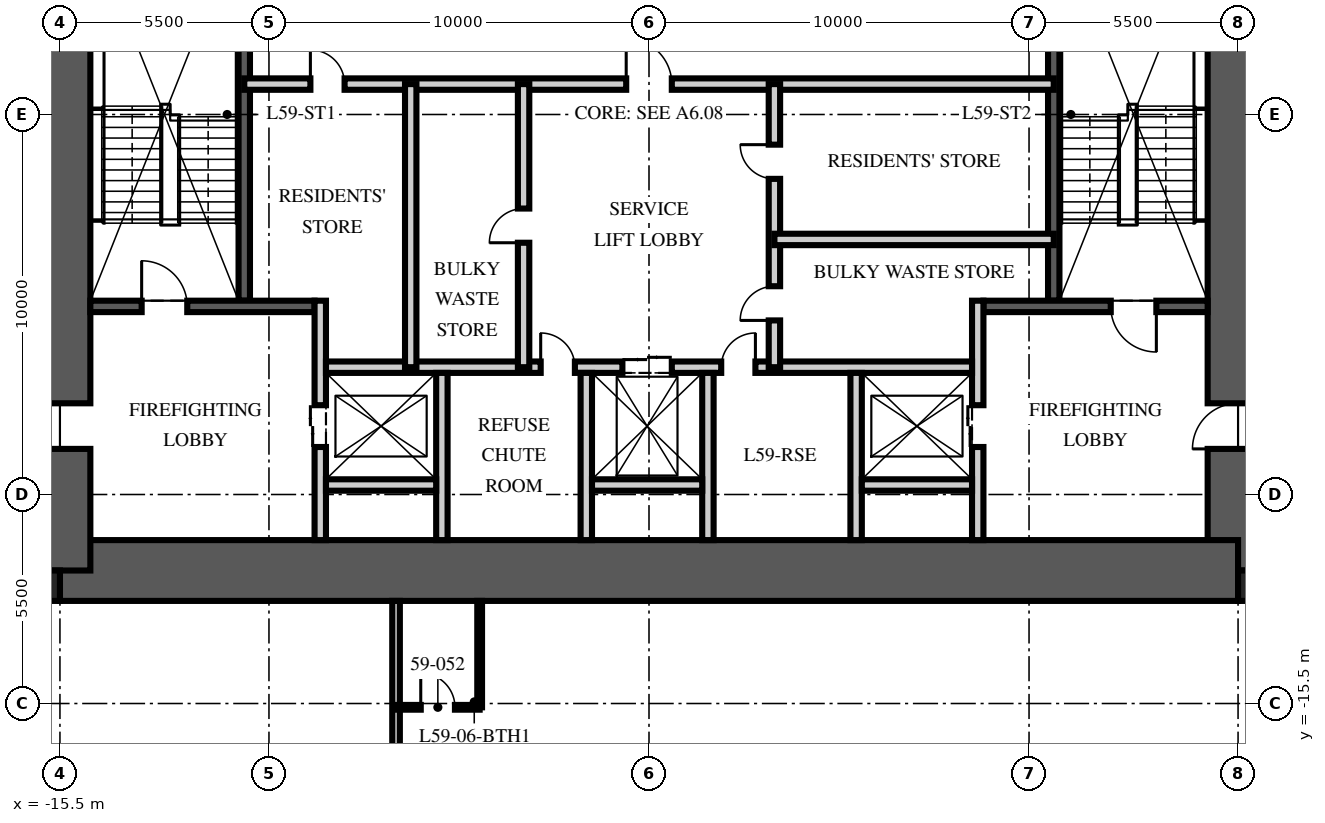
"""IFC4 building model, lengths in metres.
Left out: names, types, materials, properties, quantities, classifications, styles, units other than length and angle.
Written with IfcOpenShell. Run it as: python <this file> out.ifc"""

import sys

from ifc_helpers import new_model, si_unit, direction, frame, frame_2d, origin, origin_2d, place, context, subcontext, project, spatial, rectangle, extrude, element, fill, save


model = new_model("IFC4")
c1 = context("Model", 3, precision=1e-05, world=origin(), true_north=direction((0.0, 1.0)))
c2 = subcontext(c1, "Body", "Model", "MODEL_VIEW")
j1 = project(units=[si_unit("LENGTHUNIT", "METRE"), si_unit("PLANEANGLEUNIT", "RADIAN")], contexts=[c1])
p1 = place(None, origin())
s1 = spatial("IfcSite", under=j1, at=p1, CompositionType="ELEMENT")
p2 = place(p1, origin())
s2 = spatial("IfcBuilding", under=s1, at=p2, CompositionType="ELEMENT")
p3 = place(p2, frame((0.0, 0.0, 237.0)))
s3 = spatial("IfcBuildingStorey", under=s2, at=p3, CompositionType="ELEMENT", Elevation=237.0)
p4 = place(p3, frame((15.5, -12.0, -0.25), z_axis=(0.0, 0.0, 1.0), x_axis=(0.0, 1.0, 0.0)))
e1 = element("IfcWall", 1, at=p4, inside=s3, PredefinedType="SHEAR", context=c2, shape_type="SweptSolid", body=[
    extrude(rectangle(XDim=24.0, YDim=1.6, at=frame_2d((12.0, 0.0))), origin(), (0.0, 0.0, 1.0), 3.75),
])
p5 = place(p4, frame((3.2, 0.0, 0.25)))
e2 = element("IfcOpeningElement", 2, at=p5, cuts=e1, PredefinedType="OPENING", context=c2, shape_type="SweptSolid", body=[
    extrude(rectangle(XDim=1.2, YDim=2.1, at=frame_2d((0.6, 1.05))), frame((0.0, 0.81, 0.0), z_axis=(0.0, -1.0, 0.0), x_axis=(1.0, 0.0, 0.0)), (0.0, 0.0, 1.0), 1.62),
])
p6 = place(p4, frame((19.3, 0.0, 0.25)))
e3 = element("IfcOpeningElement", 3, at=p6, cuts=e1, PredefinedType="OPENING", context=c2, shape_type="SweptSolid", body=[
    extrude(rectangle(XDim=1.8, YDim=2.1, at=frame_2d((0.9, 1.05))), frame((0.0, 0.81, 0.0), z_axis=(0.0, -1.0, 0.0), x_axis=(1.0, 0.0, 0.0)), (0.0, 0.0, 1.0), 1.62),
])
p7 = place(p3, frame((-15.5, -12.0, -0.25), z_axis=(0.0, 0.0, 1.0), x_axis=(1.0, 0.0, 0.0)))
e4 = element("IfcWall", 4, at=p7, inside=s3, PredefinedType="SHEAR", context=c2, shape_type="SweptSolid", body=[
    extrude(rectangle(XDim=31.0, YDim=1.6, at=frame_2d((15.5, 0.0))), origin(), (0.0, 0.0, 1.0), 3.75),
])
p8 = place(p3, frame((-15.5, -12.0, -0.25), z_axis=(0.0, 0.0, 1.0), x_axis=(0.0, 1.0, 0.0)))
e5 = element("IfcWall", 5, at=p8, inside=s3, PredefinedType="SHEAR", context=c2, shape_type="SweptSolid", body=[
    extrude(rectangle(XDim=24.0, YDim=1.6, at=frame_2d((12.0, 0.0))), origin(), (0.0, 0.0, 1.0), 3.75),
])
p9 = place(p8, frame((3.2, 0.0, 0.25)))
e6 = element("IfcOpeningElement", 6, at=p9, cuts=e5, PredefinedType="OPENING", context=c2, shape_type="SweptSolid", body=[
    extrude(rectangle(XDim=1.2, YDim=2.1, at=frame_2d((0.6, 1.05))), frame((0.0, 0.81, 0.0), z_axis=(0.0, -1.0, 0.0), x_axis=(1.0, 0.0, 0.0)), (0.0, 0.0, 1.0), 1.62),
])
p10 = place(p8, frame((19.3, 0.0, 0.25)))
e7 = element("IfcOpeningElement", 7, at=p10, cuts=e5, PredefinedType="OPENING", context=c2, shape_type="SweptSolid", body=[
    extrude(rectangle(XDim=1.8, YDim=2.1, at=frame_2d((0.9, 1.05))), frame((0.0, 0.81, 0.0), z_axis=(0.0, -1.0, 0.0), x_axis=(1.0, 0.0, 0.0)), (0.0, 0.0, 1.0), 1.62),
])
for number, where, z_axis, x_axis in (
    (8, (-15.9, -12.4, -0.25), (0.0, 0.0, 1.0), (1.0, 0.0, 0.0)),
    (9, (15.9, -12.4, -0.25), (0.0, 0.0, 1.0), (1.0, 0.0, 0.0)),
):
    element("IfcColumn", number, at=place(p3, frame(where, z_axis=z_axis, x_axis=x_axis)), inside=s3, PredefinedType="COLUMN", context=c2, shape_type="SweptSolid", body=[
        extrude(rectangle(XDim=0.8, YDim=0.8, at=origin_2d()), origin(), (0.0, 0.0, 1.0), 3.75),
    ])
p11 = place(p3, frame((-10.65, -4.9, 0.0), z_axis=(0.0, 0.0, 1.0), x_axis=(0.0, 1.0, 0.0)))
e10 = element("IfcWall", 10, at=p11, inside=s3, PredefinedType="SOLIDWALL", context=c2, shape_type="SweptSolid", body=[
    extrude(rectangle(XDim=10.1, YDim=0.3, at=frame_2d((5.05, 0.0))), origin(), (0.0, 0.0, 1.0), 3.5),
])
p12 = place(p3, frame((-14.7, -5.05, 0.0), z_axis=(0.0, 0.0, 1.0), x_axis=(1.0, 0.0, 0.0)))
e11 = element("IfcWall", 11, at=p12, inside=s3, PredefinedType="SOLIDWALL", context=c2, shape_type="SweptSolid", body=[
    extrude(rectangle(XDim=5.9, YDim=0.3, at=frame_2d((2.95, 0.0))), origin(), (0.0, 0.0, 1.0), 3.5),
])
p13 = place(p12, frame((1.35, 0.0, 0.0)))
e12 = element("IfcOpeningElement", 12, at=p13, cuts=e11, PredefinedType="OPENING", context=c2, shape_type="SweptSolid", body=[
    extrude(rectangle(XDim=1.2, YDim=2.1, at=frame_2d((0.6, 1.05))), frame((0.0, 0.16, 0.0), z_axis=(0.0, -1.0, 0.0), x_axis=(1.0, 0.0, 0.0)), (0.0, 0.0, 1.0), 0.32),
])
p14 = place(p3, frame((-8.65, -11.2, 0.0), z_axis=(0.0, 0.0, 1.0), x_axis=(0.0, 1.0, 0.0)))
e13 = element("IfcWall", 13, at=p14, inside=s3, PredefinedType="PARTITIONING", context=c2, shape_type="SweptSolid", body=[
    extrude(rectangle(XDim=6.3, YDim=0.3, at=frame_2d((3.15, 0.0))), origin(), (0.0, 0.0, 1.0), 3.5),
])
p15 = place(p14, frame((2.45, 0.0, 0.0)))
e14 = element("IfcOpeningElement", 14, at=p15, cuts=e13, PredefinedType="OPENING", context=c2, shape_type="SweptSolid", body=[
    extrude(rectangle(XDim=1.1, YDim=2.1, at=frame_2d((0.55, 1.05))), frame((0.0, 0.16, 0.0), z_axis=(0.0, -1.0, 0.0), x_axis=(1.0, 0.0, 0.0)), (0.0, 0.0, 1.0), 0.32),
])
p16 = place(p3, frame((10.65, -4.9, 0.0), z_axis=(0.0, 0.0, 1.0), x_axis=(0.0, 1.0, 0.0)))
e15 = element("IfcWall", 15, at=p16, inside=s3, PredefinedType="SOLIDWALL", context=c2, shape_type="SweptSolid", body=[
    extrude(rectangle(XDim=10.1, YDim=0.3, at=frame_2d((5.05, 0.0))), origin(), (0.0, 0.0, 1.0), 3.5),
])
p17 = place(p3, frame((14.7, -5.05, 0.0), z_axis=(0.0, 0.0, 1.0), x_axis=(-1.0, 0.0, 0.0)))
e16 = element("IfcWall", 16, at=p17, inside=s3, PredefinedType="SOLIDWALL", context=c2, shape_type="SweptSolid", body=[
    extrude(rectangle(XDim=5.9, YDim=0.3, at=frame_2d((2.95, 0.0))), origin(), (0.0, 0.0, 1.0), 3.5),
])
p18 = place(p17, frame((1.35, 0.0, 0.0)))
e17 = element("IfcOpeningElement", 17, at=p18, cuts=e16, PredefinedType="OPENING", context=c2, shape_type="SweptSolid", body=[
    extrude(rectangle(XDim=1.2, YDim=2.1, at=frame_2d((0.6, 1.05))), frame((0.0, 0.16, 0.0), z_axis=(0.0, -1.0, 0.0), x_axis=(1.0, 0.0, 0.0)), (0.0, 0.0, 1.0), 0.32),
])
p19 = place(p3, frame((8.65, -11.2, 0.0), z_axis=(0.0, 0.0, 1.0), x_axis=(0.0, 1.0, 0.0)))
e18 = element("IfcWall", 18, at=p19, inside=s3, PredefinedType="PARTITIONING", context=c2, shape_type="SweptSolid", body=[
    extrude(rectangle(XDim=6.3, YDim=0.3, at=frame_2d((3.15, 0.0))), origin(), (0.0, 0.0, 1.0), 3.5),
])
p20 = place(p19, frame((2.45, 0.0, 0.0)))
e19 = element("IfcOpeningElement", 19, at=p20, cuts=e18, PredefinedType="OPENING", context=c2, shape_type="SweptSolid", body=[
    extrude(rectangle(XDim=1.1, YDim=2.1, at=frame_2d((0.55, 1.05))), frame((0.0, 0.16, 0.0), z_axis=(0.0, -1.0, 0.0), x_axis=(1.0, 0.0, 0.0)), (0.0, 0.0, 1.0), 0.32),
])
p21 = place(p3, frame((-8.5, -6.65, 0.0), z_axis=(0.0, 0.0, 1.0), x_axis=(1.0, 0.0, 0.0)))
e20 = element("IfcWall", 20, at=p21, inside=s3, PredefinedType="PARTITIONING", context=c2, shape_type="SweptSolid", body=[
    extrude(rectangle(XDim=17.0, YDim=0.3, at=frame_2d((8.5, 0.0))), origin(), (0.0, 0.0, 1.0), 3.5),
])
p22 = place(p21, frame((7.8, 0.0, 0.0)))
e21 = element("IfcOpeningElement", 21, at=p22, cuts=e20, PredefinedType="OPENING", context=c2, shape_type="SweptSolid", body=[
    extrude(rectangle(XDim=1.3, YDim=2.4, at=frame_2d((0.65, 1.2))), frame((0.0, 0.16, 0.0), z_axis=(0.0, -1.0, 0.0), x_axis=(1.0, 0.0, 0.0)), (0.0, 0.0, 1.0), 0.32),
])
p23 = place(p21, frame((5.65, 0.0, 0.0)))
e22 = element("IfcOpeningElement", 22, at=p23, cuts=e20, PredefinedType="OPENING", context=c2, shape_type="SweptSolid", body=[
    extrude(rectangle(XDim=0.9, YDim=2.1, at=frame_2d((0.45, 1.05))), frame((0.0, 0.16, 0.0), z_axis=(0.0, -1.0, 0.0), x_axis=(1.0, 0.0, 0.0)), (0.0, 0.0, 1.0), 0.32),
])
p24 = place(p21, frame((10.4, 0.0, 0.0)))
e23 = element("IfcOpeningElement", 23, at=p24, cuts=e20, PredefinedType="OPENING", context=c2, shape_type="SweptSolid", body=[
    extrude(rectangle(XDim=0.9, YDim=2.1, at=frame_2d((0.45, 1.05))), frame((0.0, 0.16, 0.0), z_axis=(0.0, -1.0, 0.0), x_axis=(1.0, 0.0, 0.0)), (0.0, 0.0, 1.0), 0.32),
])
for number, where, z_axis, x_axis in (
    (24, (-5.45, -11.2, 0.0), (0.0, 0.0, 1.0), (0.0, 1.0, 0.0)),
    (25, (-1.65, -11.2, 0.0), (0.0, 0.0, 1.0), (0.0, 1.0, 0.0)),
    (26, (1.55, -11.2, 0.0), (0.0, 0.0, 1.0), (0.0, 1.0, 0.0)),
    (27, (5.45, -11.2, 0.0), (0.0, 0.0, 1.0), (0.0, 1.0, 0.0)),
):
    element("IfcWall", number, at=place(p3, frame(where, z_axis=z_axis, x_axis=x_axis)), inside=s3, PredefinedType="PARTITIONING", context=c2, shape_type="SweptSolid", body=[
        extrude(rectangle(XDim=4.4, YDim=0.3, at=frame_2d((2.2, 0.0))), origin(), (0.0, 0.0, 1.0), 3.5),
    ])
for number, where, z_axis, x_axis in (
    (28, (-8.5, -9.75, 0.0), (0.0, 0.0, 1.0), (1.0, 0.0, 0.0)),
    (29, (-1.5, -9.75, 0.0), (0.0, 0.0, 1.0), (1.0, 0.0, 0.0)),
    (30, (5.6, -9.75, 0.0), (0.0, 0.0, 1.0), (1.0, 0.0, 0.0)),
):
    element("IfcWall", number, at=place(p3, frame(where, z_axis=z_axis, x_axis=x_axis)), inside=s3, PredefinedType="PARTITIONING", context=c2, shape_type="SweptSolid", body=[
        extrude(rectangle(XDim=2.9, YDim=0.3, at=frame_2d((1.45, 0.0))), origin(), (0.0, 0.0, 1.0), 3.5),
    ])
p25 = place(p3, frame((-10.65, 0.8, 0.0), z_axis=(0.0, 0.0, 1.0), x_axis=(1.0, 0.0, 0.0)))
e31 = element("IfcWall", 31, at=p25, inside=s3, PredefinedType="PARTITIONING", context=c2, shape_type="SweptSolid", body=[
    extrude(rectangle(XDim=21.3, YDim=0.3, at=frame_2d((10.65, 0.0))), origin(), (0.0, 0.0, 1.0), 3.5),
])
p26 = place(p25, frame((10.05, 0.0, 0.0)))
e32 = element("IfcOpeningElement", 32, at=p26, cuts=e31, PredefinedType="OPENING", context=c2, shape_type="SweptSolid", body=[
    extrude(rectangle(XDim=1.2, YDim=2.1, at=frame_2d((0.6, 1.05))), frame((0.0, 0.16, 0.0), z_axis=(0.0, -1.0, 0.0), x_axis=(1.0, 0.0, 0.0)), (0.0, 0.0, 1.0), 0.32),
])
p27 = place(p25, frame((1.74, 0.0, 0.0)))
e33 = element("IfcOpeningElement", 33, at=p27, cuts=e31, PredefinedType="OPENING", context=c2, shape_type="SweptSolid", body=[
    extrude(rectangle(XDim=0.9, YDim=2.1, at=frame_2d((0.45, 1.05))), frame((0.0, 0.16, 0.0), z_axis=(0.0, -1.0, 0.0), x_axis=(1.0, 0.0, 0.0)), (0.0, 0.0, 1.0), 0.32),
])
p28 = place(p3, frame((-3.3, -6.65, 0.0), z_axis=(0.0, 0.0, 1.0), x_axis=(0.0, 1.0, 0.0)))
e34 = element("IfcWall", 34, at=p28, inside=s3, PredefinedType="PARTITIONING", context=c2, shape_type="SweptSolid", body=[
    extrude(rectangle(XDim=7.45, YDim=0.3, at=frame_2d((3.725, 0.0))), origin(), (0.0, 0.0, 1.0), 3.5),
])
p29 = place(p28, frame((3.275, 0.0, 0.0)))
e35 = element("IfcOpeningElement", 35, at=p29, cuts=e34, PredefinedType="OPENING", context=c2, shape_type="SweptSolid", body=[
    extrude(rectangle(XDim=0.9, YDim=2.1, at=frame_2d((0.45, 1.05))), frame((0.0, 0.16, 0.0), z_axis=(0.0, -1.0, 0.0), x_axis=(1.0, 0.0, 0.0)), (0.0, 0.0, 1.0), 0.32),
])
p30 = place(p3, frame((3.3, -6.65, 0.0), z_axis=(0.0, 0.0, 1.0), x_axis=(0.0, 1.0, 0.0)))
e36 = element("IfcWall", 36, at=p30, inside=s3, PredefinedType="PARTITIONING", context=c2, shape_type="SweptSolid", body=[
    extrude(rectangle(XDim=7.45, YDim=0.3, at=frame_2d((3.725, 0.0))), origin(), (0.0, 0.0, 1.0), 3.5),
])
p31 = place(p30, frame((1.231, 0.0, 0.0)))
e37 = element("IfcOpeningElement", 37, at=p31, cuts=e36, PredefinedType="OPENING", context=c2, shape_type="SweptSolid", body=[
    extrude(rectangle(XDim=0.9, YDim=2.1, at=frame_2d((0.45, 1.05))), frame((0.0, 0.16, 0.0), z_axis=(0.0, -1.0, 0.0), x_axis=(1.0, 0.0, 0.0)), (0.0, 0.0, 1.0), 0.32),
])
p32 = place(p30, frame((4.956, 0.0, 0.0)))
e38 = element("IfcOpeningElement", 38, at=p32, cuts=e36, PredefinedType="OPENING", context=c2, shape_type="SweptSolid", body=[
    extrude(rectangle(XDim=0.9, YDim=2.1, at=frame_2d((0.45, 1.05))), frame((0.0, 0.16, 0.0), z_axis=(0.0, -1.0, 0.0), x_axis=(1.0, 0.0, 0.0)), (0.0, 0.0, 1.0), 0.32),
])
p33 = place(p3, frame((-6.27, -6.65, 0.0), z_axis=(0.0, 0.0, 1.0), x_axis=(0.0, 1.0, 0.0)))
e39 = element("IfcWall", 39, at=p33, inside=s3, PredefinedType="PARTITIONING", context=c2, shape_type="SweptSolid", body=[
    extrude(rectangle(XDim=7.45, YDim=0.3, at=frame_2d((3.725, 0.0))), origin(), (0.0, 0.0, 1.0), 3.5),
])
p34 = place(p3, frame((10.65, -3.288, 0.0), z_axis=(0.0, 0.0, 1.0), x_axis=(-1.0, 0.0, 0.0)))
e40 = element("IfcWall", 40, at=p34, inside=s3, PredefinedType="PARTITIONING", context=c2, shape_type="SweptSolid", body=[
    extrude(rectangle(XDim=7.35, YDim=0.3, at=frame_2d((3.675, 0.0))), origin(), (0.0, 0.0, 1.0), 3.5),
])
p35 = place(p3, frame((-6.656, -12.8, 0.0), z_axis=(0.0, 0.0, 1.0), x_axis=(0.0, -1.0, 0.0)))
e41 = element("IfcWall", 41, at=p35, inside=s3, PredefinedType="PARTITIONING", context=c2, shape_type="SweptSolid", body=[
    extrude(rectangle(XDim=13.15, YDim=0.2, at=frame_2d((6.575, 0.0))), origin(), (0.0, 0.0, 1.0), 2.91),
])
p36 = place(p3, frame((-6.656, -15.6, 0.0), z_axis=(0.0, 0.0, 1.0), x_axis=(1.0, 0.0, 0.0)))
e42 = element("IfcWall", 42, at=p36, inside=s3, PredefinedType="PARTITIONING", context=c2, shape_type="SweptSolid", body=[
    extrude(rectangle(XDim=2.2, YDim=0.125, at=frame_2d((1.1, 0.0))), origin(), (0.0, 0.0, 1.0), 3.5),
])
p37 = place(p36, frame((0.65, 0.0, 0.0)))
e43 = element("IfcOpeningElement", 43, at=p37, cuts=e42, PredefinedType="OPENING", context=c2, shape_type="SweptSolid", body=[
    extrude(rectangle(XDim=0.9, YDim=2.1, at=frame_2d((0.45, 1.05))), frame((0.0, 0.073, 0.0), z_axis=(0.0, -1.0, 0.0), x_axis=(1.0, 0.0, 0.0)), (0.0, 0.0, 1.0), 0.145),
])
p38 = place(p3, frame((-4.456, -12.8, 0.0), z_axis=(0.0, 0.0, 1.0), x_axis=(0.0, -1.0, 0.0)))
e44 = element("IfcWall", 44, at=p38, inside=s3, PredefinedType="PARTITIONING", context=c2, shape_type="SweptSolid", body=[
    extrude(rectangle(XDim=2.8, YDim=0.125, at=frame_2d((1.4, 0.0))), origin(), (0.0, 0.0, 1.0), 3.5),
])
p39 = place(p13, origin())
e45 = element("IfcDoor", 45, at=p39, inside=s3, OperationType="SINGLE_SWING_LEFT", PredefinedType="DOOR", context=c2, shape_type="SweptSolid", body=[
    extrude(rectangle(XDim=1.2, YDim=2.1, at=frame_2d((0.6, 1.05))), frame((0.0, 0.025, 0.0), z_axis=(0.0, -1.0, 0.0), x_axis=(1.0, 0.0, 0.0)), (0.0, 0.0, 1.0), 0.05),
])
fill(e12, e45)
p40 = place(p9, origin())
e46 = element("IfcDoor", 46, at=p40, inside=s3, OperationType="SINGLE_SWING_LEFT", PredefinedType="DOOR", context=c2, shape_type="SweptSolid", body=[
    extrude(rectangle(XDim=1.2, YDim=2.1, at=frame_2d((0.6, 1.05))), frame((0.0, 0.025, 0.0), z_axis=(0.0, -1.0, 0.0), x_axis=(1.0, 0.0, 0.0)), (0.0, 0.0, 1.0), 0.05),
])
fill(e6, e46)
p41 = place(p18, origin())
e47 = element("IfcDoor", 47, at=p41, inside=s3, OperationType="SINGLE_SWING_LEFT", PredefinedType="DOOR", context=c2, shape_type="SweptSolid", body=[
    extrude(rectangle(XDim=1.2, YDim=2.1, at=frame_2d((0.6, 1.05))), frame((0.0, 0.025, 0.0), z_axis=(0.0, -1.0, 0.0), x_axis=(1.0, 0.0, 0.0)), (0.0, 0.0, 1.0), 0.05),
])
fill(e17, e47)
p42 = place(p5, origin())
e48 = element("IfcDoor", 48, at=p42, inside=s3, OperationType="SINGLE_SWING_LEFT", PredefinedType="DOOR", context=c2, shape_type="SweptSolid", body=[
    extrude(rectangle(XDim=1.2, YDim=2.1, at=frame_2d((0.6, 1.05))), frame((0.0, 0.025, 0.0), z_axis=(0.0, -1.0, 0.0), x_axis=(1.0, 0.0, 0.0)), (0.0, 0.0, 1.0), 0.05),
])
fill(e2, e48)
p43 = place(p15, origin())
e49 = element("IfcDoor", 49, at=p43, inside=s3, OperationType="DOUBLE_DOOR_SLIDING", PredefinedType="DOOR", context=c2, shape_type="SweptSolid", body=[
    extrude(rectangle(XDim=1.1, YDim=2.1, at=frame_2d((0.55, 1.05))), frame((0.0, 0.025, 0.0), z_axis=(0.0, -1.0, 0.0), x_axis=(1.0, 0.0, 0.0)), (0.0, 0.0, 1.0), 0.05),
])
fill(e14, e49)
p44 = place(p20, origin())
e50 = element("IfcDoor", 50, at=p44, inside=s3, OperationType="DOUBLE_DOOR_SLIDING", PredefinedType="DOOR", context=c2, shape_type="SweptSolid", body=[
    extrude(rectangle(XDim=1.1, YDim=2.1, at=frame_2d((0.55, 1.05))), frame((0.0, 0.025, 0.0), z_axis=(0.0, -1.0, 0.0), x_axis=(1.0, 0.0, 0.0)), (0.0, 0.0, 1.0), 0.05),
])
fill(e19, e50)
p45 = place(p22, origin())
e51 = element("IfcDoor", 51, at=p45, inside=s3, OperationType="DOUBLE_DOOR_SLIDING", PredefinedType="DOOR", context=c2, shape_type="SweptSolid", body=[
    extrude(rectangle(XDim=1.3, YDim=2.4, at=frame_2d((0.65, 1.2))), frame((0.0, 0.025, 0.0), z_axis=(0.0, -1.0, 0.0), x_axis=(1.0, 0.0, 0.0)), (0.0, 0.0, 1.0), 0.05),
])
fill(e21, e51)
p46 = place(p26, origin())
e52 = element("IfcDoor", 52, at=p46, inside=s3, OperationType="SINGLE_SWING_LEFT", PredefinedType="DOOR", context=c2, shape_type="SweptSolid", body=[
    extrude(rectangle(XDim=1.2, YDim=2.1, at=frame_2d((0.6, 1.05))), frame((0.0, 0.025, 0.0), z_axis=(0.0, -1.0, 0.0), x_axis=(1.0, 0.0, 0.0)), (0.0, 0.0, 1.0), 0.05),
])
fill(e32, e52)
p47 = place(p23, origin())
e53 = element("IfcDoor", 53, at=p47, inside=s3, OperationType="SINGLE_SWING_LEFT", PredefinedType="DOOR", context=c2, shape_type="SweptSolid", body=[
    extrude(rectangle(XDim=0.9, YDim=2.1, at=frame_2d((0.45, 1.05))), frame((0.0, 0.025, 0.0), z_axis=(0.0, -1.0, 0.0), x_axis=(1.0, 0.0, 0.0)), (0.0, 0.0, 1.0), 0.05),
])
fill(e22, e53)
p48 = place(p24, origin())
e54 = element("IfcDoor", 54, at=p48, inside=s3, OperationType="SINGLE_SWING_RIGHT", PredefinedType="DOOR", context=c2, shape_type="SweptSolid", body=[
    extrude(rectangle(XDim=0.9, YDim=2.1, at=frame_2d((0.45, 1.05))), frame((0.0, 0.025, 0.0), z_axis=(0.0, -1.0, 0.0), x_axis=(1.0, 0.0, 0.0)), (0.0, 0.0, 1.0), 0.05),
])
fill(e23, e54)
p49 = place(p29, origin())
e55 = element("IfcDoor", 55, at=p49, inside=s3, OperationType="SINGLE_SWING_LEFT", PredefinedType="DOOR", context=c2, shape_type="SweptSolid", body=[
    extrude(rectangle(XDim=0.9, YDim=2.1, at=frame_2d((0.45, 1.05))), frame((0.0, 0.025, 0.0), z_axis=(0.0, -1.0, 0.0), x_axis=(1.0, 0.0, 0.0)), (0.0, 0.0, 1.0), 0.05),
])
fill(e35, e55)
p50 = place(p27, origin())
e56 = element("IfcDoor", 56, at=p50, inside=s3, OperationType="SINGLE_SWING_LEFT", PredefinedType="DOOR", context=c2, shape_type="SweptSolid", body=[
    extrude(rectangle(XDim=0.9, YDim=2.1, at=frame_2d((0.45, 1.05))), frame((0.0, 0.025, 0.0), z_axis=(0.0, -1.0, 0.0), x_axis=(1.0, 0.0, 0.0)), (0.0, 0.0, 1.0), 0.05),
])
fill(e33, e56)
p51 = place(p31, origin())
e57 = element("IfcDoor", 57, at=p51, inside=s3, OperationType="SINGLE_SWING_LEFT", PredefinedType="DOOR", context=c2, shape_type="SweptSolid", body=[
    extrude(rectangle(XDim=0.9, YDim=2.1, at=frame_2d((0.45, 1.05))), frame((0.0, 0.025, 0.0), z_axis=(0.0, -1.0, 0.0), x_axis=(1.0, 0.0, 0.0)), (0.0, 0.0, 1.0), 0.05),
])
fill(e37, e57)
p52 = place(p32, origin())
e58 = element("IfcDoor", 58, at=p52, inside=s3, OperationType="SINGLE_SWING_RIGHT", PredefinedType="DOOR", context=c2, shape_type="SweptSolid", body=[
    extrude(rectangle(XDim=0.9, YDim=2.1, at=frame_2d((0.45, 1.05))), frame((0.0, 0.025, 0.0), z_axis=(0.0, -1.0, 0.0), x_axis=(1.0, 0.0, 0.0)), (0.0, 0.0, 1.0), 0.05),
])
fill(e38, e58)
p53 = place(p37, origin())
e59 = element("IfcDoor", 59, at=p53, inside=s3, OperationType="SINGLE_SWING_LEFT", PredefinedType="DOOR", context=c2, shape_type="SweptSolid", body=[
    extrude(rectangle(XDim=0.9, YDim=2.1, at=frame_2d((0.45, 1.05))), frame((0.0, 0.025, 0.0), z_axis=(0.0, -1.0, 0.0), x_axis=(1.0, 0.0, 0.0)), (0.0, 0.0, 1.0), 0.05),
])
fill(e43, e59)
save(model, sys.argv[1])
